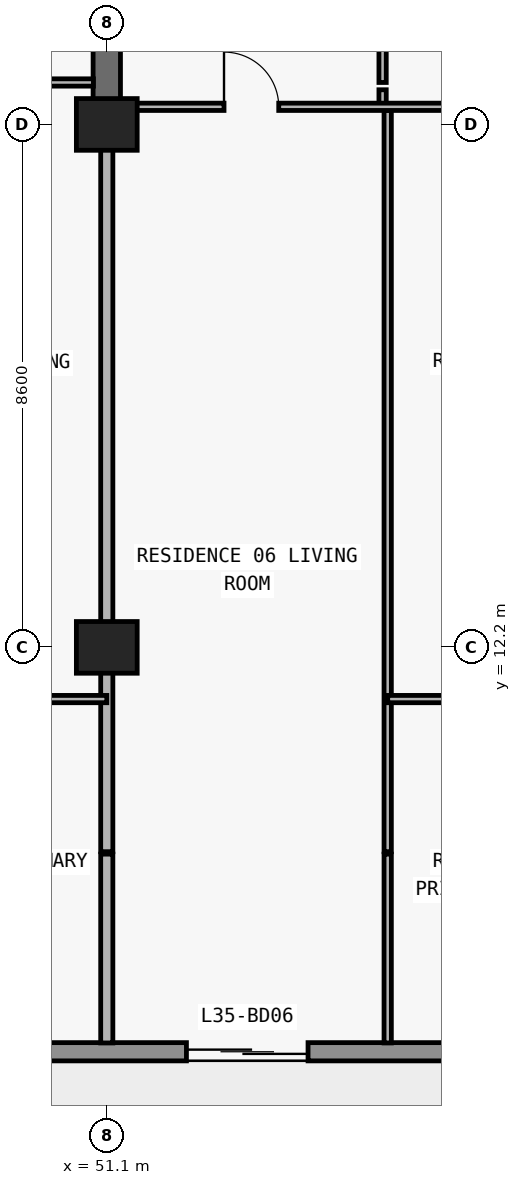
"""IFC4 building model, lengths in metres.
Left out: names, types, materials, properties, quantities, classifications, styles, units other than length and angle.
Written with IfcOpenShell. Run it as: python <this file> out.ifc"""

import sys

from ifc_helpers import new_model, si_unit, direction, frame, frame_2d, origin, origin_2d, place, context, subcontext, project, spatial, rectangle, extrude, element, fill, save


model = new_model("IFC4")
c1 = context("Model", 3, precision=1e-05, world=origin(), true_north=direction((0.0, 1.0)))
c2 = subcontext(c1, "Body", "Model", "MODEL_VIEW")
j1 = project(units=[si_unit("LENGTHUNIT", "METRE"), si_unit("PLANEANGLEUNIT", "RADIAN")], contexts=[c1])
p1 = place(None, origin())
s1 = spatial("IfcSite", under=j1, at=p1, CompositionType="ELEMENT")
p2 = place(p1, origin())
s2 = spatial("IfcBuilding", under=s1, at=p2, CompositionType="ELEMENT")
p3 = place(p2, frame((0.0, 0.0, 129.0)))
s3 = spatial("IfcBuildingStorey", under=s2, at=p3, CompositionType="ELEMENT", Elevation=129.0)
for number, where, z_axis, x_axis in (
    (1, (51.1, 12.2, 0.0), (0.0, 0.0, 1.0), (1.0, 0.0, 0.0)),
    (2, (51.1, 20.8, 0.0), (0.0, 0.0, 1.0), (1.0, 0.0, 0.0)),
):
    element("IfcColumn", number, at=place(p3, frame(where, z_axis=z_axis, x_axis=x_axis)), inside=s3, PredefinedType="COLUMN", context=c2, shape_type="SweptSolid", body=[
        extrude(rectangle(XDim=1.0, YDim=0.85, at=origin_2d()), origin(), (0.0, 0.0, 1.0), 3.05),
    ])
p4 = place(p3, frame((51.1, 20.8, 0.0), z_axis=(0.0, 0.0, 1.0), x_axis=(0.0, 1.0, 0.0)))
e3 = element("IfcWall", 3, at=p4, inside=s3, PredefinedType="SHEAR", context=c2, shape_type="SweptSolid", body=[
    extrude(rectangle(XDim=8.6, YDim=0.45, at=frame_2d((4.3, 0.0))), origin(), (0.0, 0.0, 1.0), 3.05),
])
p5 = place(p3, frame((70.1, 5.55, 0.0), z_axis=(0.0, 0.0, 1.0), x_axis=(-1.0, 0.0, 0.0)))
e4 = element("IfcWall", 4, at=p5, inside=s3, PredefinedType="STANDARD", context=c2, shape_type="SweptSolid", body=[
    extrude(rectangle(XDim=62.4, YDim=0.3, at=frame_2d((31.2, 0.0))), origin(), (0.0, 0.0, 1.0), 3.05),
])
p6 = place(p5, frame((57.226, 0.0, 0.0)))
e5 = element("IfcOpeningElement", 5, at=p6, cuts=e4, PredefinedType="OPENING", context=c2, shape_type="SweptSolid", body=[
    extrude(rectangle(XDim=2.0, YDim=2.3, at=frame_2d((1.0, 1.15))), frame((0.0, 0.16, 0.0), z_axis=(0.0, -1.0, 0.0), x_axis=(1.0, 0.0, 0.0)), (0.0, 0.0, 1.0), 0.32),
])
p7 = place(p5, frame((52.926, 0.0, 0.85)))
e6 = element("IfcOpeningElement", 6, at=p7, cuts=e4, PredefinedType="OPENING", context=c2, shape_type="SweptSolid", body=[
    extrude(rectangle(XDim=2.2, YDim=1.55, at=frame_2d((1.1, 0.775))), frame((0.0, 0.16, 0.0), z_axis=(0.0, -1.0, 0.0), x_axis=(1.0, 0.0, 0.0)), (0.0, 0.0, 1.0), 0.32),
])
p8 = place(p5, frame((48.49, 0.0, 0.0)))
e7 = element("IfcOpeningElement", 7, at=p8, cuts=e4, PredefinedType="OPENING", context=c2, shape_type="SweptSolid", body=[
    extrude(rectangle(XDim=2.0, YDim=2.3, at=frame_2d((1.0, 1.15))), frame((0.0, 0.16, 0.0), z_axis=(0.0, -1.0, 0.0), x_axis=(1.0, 0.0, 0.0)), (0.0, 0.0, 1.0), 0.32),
])
p9 = place(p5, frame((44.39, 0.0, 0.85)))
e8 = element("IfcOpeningElement", 8, at=p9, cuts=e4, PredefinedType="OPENING", context=c2, shape_type="SweptSolid", body=[
    extrude(rectangle(XDim=1.8, YDim=1.55, at=frame_2d((0.9, 0.775))), frame((0.0, 0.16, 0.0), z_axis=(0.0, -1.0, 0.0), x_axis=(1.0, 0.0, 0.0)), (0.0, 0.0, 1.0), 0.32),
])
p10 = place(p5, frame((40.426, 0.0, 0.0)))
e9 = element("IfcOpeningElement", 9, at=p10, cuts=e4, PredefinedType="OPENING", context=c2, shape_type="SweptSolid", body=[
    extrude(rectangle(XDim=2.0, YDim=2.3, at=frame_2d((1.0, 1.15))), frame((0.0, 0.16, 0.0), z_axis=(0.0, -1.0, 0.0), x_axis=(1.0, 0.0, 0.0)), (0.0, 0.0, 1.0), 0.32),
])
p11 = place(p5, frame((36.126, 0.0, 0.85)))
e10 = element("IfcOpeningElement", 10, at=p11, cuts=e4, PredefinedType="OPENING", context=c2, shape_type="SweptSolid", body=[
    extrude(rectangle(XDim=2.2, YDim=1.55, at=frame_2d((1.1, 0.775))), frame((0.0, 0.16, 0.0), z_axis=(0.0, -1.0, 0.0), x_axis=(1.0, 0.0, 0.0)), (0.0, 0.0, 1.0), 0.32),
])
p12 = place(p5, frame((31.91, 0.0, 0.0)))
e11 = element("IfcOpeningElement", 11, at=p12, cuts=e4, PredefinedType="OPENING", context=c2, shape_type="SweptSolid", body=[
    extrude(rectangle(XDim=2.0, YDim=2.3, at=frame_2d((1.0, 1.15))), frame((0.0, 0.16, 0.0), z_axis=(0.0, -1.0, 0.0), x_axis=(1.0, 0.0, 0.0)), (0.0, 0.0, 1.0), 0.32),
])
p13 = place(p5, frame((28.21, 0.0, 0.85)))
e12 = element("IfcOpeningElement", 12, at=p13, cuts=e4, PredefinedType="OPENING", context=c2, shape_type="SweptSolid", body=[
    extrude(rectangle(XDim=1.8, YDim=1.55, at=frame_2d((0.9, 0.775))), frame((0.0, 0.16, 0.0), z_axis=(0.0, -1.0, 0.0), x_axis=(1.0, 0.0, 0.0)), (0.0, 0.0, 1.0), 0.32),
])
p14 = place(p5, frame((24.426, 0.0, 0.0)))
e13 = element("IfcOpeningElement", 13, at=p14, cuts=e4, PredefinedType="OPENING", context=c2, shape_type="SweptSolid", body=[
    extrude(rectangle(XDim=2.0, YDim=2.3, at=frame_2d((1.0, 1.15))), frame((0.0, 0.16, 0.0), z_axis=(0.0, -1.0, 0.0), x_axis=(1.0, 0.0, 0.0)), (0.0, 0.0, 1.0), 0.32),
])
p15 = place(p5, frame((20.126, 0.0, 0.85)))
e14 = element("IfcOpeningElement", 14, at=p15, cuts=e4, PredefinedType="OPENING", context=c2, shape_type="SweptSolid", body=[
    extrude(rectangle(XDim=2.2, YDim=1.55, at=frame_2d((1.1, 0.775))), frame((0.0, 0.16, 0.0), z_axis=(0.0, -1.0, 0.0), x_axis=(1.0, 0.0, 0.0)), (0.0, 0.0, 1.0), 0.32),
])
p16 = place(p5, frame((15.69, 0.0, 0.0)))
e15 = element("IfcOpeningElement", 15, at=p16, cuts=e4, PredefinedType="OPENING", context=c2, shape_type="SweptSolid", body=[
    extrude(rectangle(XDim=2.0, YDim=2.3, at=frame_2d((1.0, 1.15))), frame((0.0, 0.16, 0.0), z_axis=(0.0, -1.0, 0.0), x_axis=(1.0, 0.0, 0.0)), (0.0, 0.0, 1.0), 0.32),
])
p17 = place(p5, frame((11.59, 0.0, 0.85)))
e16 = element("IfcOpeningElement", 16, at=p17, cuts=e4, PredefinedType="OPENING", context=c2, shape_type="SweptSolid", body=[
    extrude(rectangle(XDim=1.8, YDim=1.55, at=frame_2d((0.9, 0.775))), frame((0.0, 0.16, 0.0), z_axis=(0.0, -1.0, 0.0), x_axis=(1.0, 0.0, 0.0)), (0.0, 0.0, 1.0), 0.32),
])
p18 = place(p5, frame((7.626, 0.0, 0.0)))
e17 = element("IfcOpeningElement", 17, at=p18, cuts=e4, PredefinedType="OPENING", context=c2, shape_type="SweptSolid", body=[
    extrude(rectangle(XDim=2.0, YDim=2.3, at=frame_2d((1.0, 1.15))), frame((0.0, 0.16, 0.0), z_axis=(0.0, -1.0, 0.0), x_axis=(1.0, 0.0, 0.0)), (0.0, 0.0, 1.0), 0.32),
])
p19 = place(p5, frame((3.326, 0.0, 0.85)))
e18 = element("IfcOpeningElement", 18, at=p19, cuts=e4, PredefinedType="OPENING", context=c2, shape_type="SweptSolid", body=[
    extrude(rectangle(XDim=2.2, YDim=1.55, at=frame_2d((1.1, 0.775))), frame((0.0, 0.16, 0.0), z_axis=(0.0, -1.0, 0.0), x_axis=(1.0, 0.0, 0.0)), (0.0, 0.0, 1.0), 0.32),
])
p20 = place(p3, frame((51.1, 5.695, 0.0), z_axis=(0.0, 0.0, 1.0), x_axis=(0.0, 1.0, 0.0)))
e19 = element("IfcWall", 19, at=p20, inside=s3, PredefinedType="PARTITIONING", context=c2, shape_type="SweptSolid", body=[
    extrude(rectangle(XDim=3.105, YDim=0.2, at=frame_2d((1.552, 0.0))), origin(), (0.0, 0.0, 1.0), 3.05),
])
p21 = place(p3, frame((51.1, 8.84, 0.0), z_axis=(0.0, 0.0, 1.0), x_axis=(0.0, 1.0, 0.0)))
e20 = element("IfcWall", 20, at=p21, inside=s3, PredefinedType="PARTITIONING", context=c2, shape_type="SweptSolid", body=[
    extrude(rectangle(XDim=11.955, YDim=0.2, at=frame_2d((5.978, 0.0))), origin(), (0.0, 0.0, 1.0), 2.174),
])
p22 = place(p3, frame((55.636, 21.13, 0.0), z_axis=(0.0, 0.0, 1.0), x_axis=(0.0, 1.0, 0.0)))
e21 = element("IfcWall", 21, at=p22, inside=s3, PredefinedType="PARTITIONING", context=c2, shape_type="SweptSolid", body=[
    extrude(rectangle(XDim=0.24, YDim=0.12, at=frame_2d((0.12, 0.0))), origin(), (0.0, 0.0, 1.0), 3.05),
])
p23 = place(p3, frame((55.636, 21.49, 0.0), z_axis=(0.0, 0.0, 1.0), x_axis=(0.0, 1.0, 0.0)))
e22 = element("IfcWall", 22, at=p23, inside=s3, PredefinedType="PARTITIONING", context=c2, shape_type="SweptSolid", body=[
    extrude(rectangle(XDim=4.69, YDim=0.12, at=frame_2d((2.345, 0.0))), origin(), (0.0, 0.0, 1.0), 3.05),
])
p24 = place(p23, frame((1.895, 0.0, 0.0)))
e23 = element("IfcOpeningElement", 23, at=p24, cuts=e22, PredefinedType="OPENING", context=c2, shape_type="SweptSolid", body=[
    extrude(rectangle(XDim=0.9, YDim=2.15, at=frame_2d((0.45, 1.075))), frame((0.0, 0.07, 0.0), z_axis=(0.0, -1.0, 0.0), x_axis=(1.0, 0.0, 0.0)), (0.0, 0.0, 1.0), 0.14),
])
p25 = place(p3, frame((55.72, 5.695, 0.0), z_axis=(0.0, 0.0, 1.0), x_axis=(0.0, 1.0, 0.0)))
e24 = element("IfcWall", 24, at=p25, inside=s3, PredefinedType="PARTITIONING", context=c2, shape_type="SweptSolid", body=[
    extrude(rectangle(XDim=3.105, YDim=0.12, at=frame_2d((1.552, 0.0))), origin(), (0.0, 0.0, 1.0), 3.05),
])
p26 = place(p3, frame((55.72, 8.84, 0.0), z_axis=(0.0, 0.0, 1.0), x_axis=(0.0, 1.0, 0.0)))
e25 = element("IfcWall", 25, at=p26, inside=s3, PredefinedType="PARTITIONING", context=c2, shape_type="SweptSolid", body=[
    extrude(rectangle(XDim=12.19, YDim=0.12, at=frame_2d((6.095, 0.0))), origin(), (0.0, 0.0, 1.0), 3.05),
])
p27 = place(p3, frame((46.648, 11.35, 0.0), z_axis=(0.0, 0.0, 1.0), x_axis=(1.0, 0.0, 0.0)))
e26 = element("IfcWall", 26, at=p27, inside=s3, PredefinedType="PARTITIONING", context=c2, shape_type="SweptSolid", body=[
    extrude(rectangle(XDim=4.452, YDim=0.12, at=frame_2d((2.226, 0.0))), origin(), (0.0, 0.0, 1.0), 3.05),
])
p28 = place(p27, frame((1.776, 0.0, 0.0)))
e27 = element("IfcOpeningElement", 27, at=p28, cuts=e26, PredefinedType="OPENING", context=c2, shape_type="SweptSolid", body=[
    extrude(rectangle(XDim=0.9, YDim=2.15, at=frame_2d((0.45, 1.075))), frame((0.0, 0.07, 0.0), z_axis=(0.0, -1.0, 0.0), x_axis=(1.0, 0.0, 0.0)), (0.0, 0.0, 1.0), 0.14),
])
p29 = place(p3, frame((55.72, 11.35, 0.0), z_axis=(0.0, 0.0, 1.0), x_axis=(1.0, 0.0, 0.0)))
e28 = element("IfcWall", 28, at=p29, inside=s3, PredefinedType="PARTITIONING", context=c2, shape_type="SweptSolid", body=[
    extrude(rectangle(XDim=3.78, YDim=0.12, at=frame_2d((1.89, 0.0))), origin(), (0.0, 0.0, 1.0), 3.05),
])
p30 = place(p29, frame((1.44, 0.0, 0.0)))
e29 = element("IfcOpeningElement", 29, at=p30, cuts=e28, PredefinedType="OPENING", context=c2, shape_type="SweptSolid", body=[
    extrude(rectangle(XDim=0.9, YDim=2.15, at=frame_2d((0.45, 1.075))), frame((0.0, 0.07, 0.0), z_axis=(0.0, -1.0, 0.0), x_axis=(1.0, 0.0, 0.0)), (0.0, 0.0, 1.0), 0.14),
])
p31 = place(p3, frame((51.32, 21.09, 0.0), z_axis=(0.0, 0.0, 1.0), x_axis=(1.0, 0.0, 0.0)))
e30 = element("IfcWall", 30, at=p31, inside=s3, PredefinedType="PARTITIONING", context=c2, shape_type="SweptSolid", body=[
    extrude(rectangle(XDim=8.18, YDim=0.12, at=frame_2d((4.09, 0.0))), origin(), (0.0, 0.0, 1.0), 2.174),
])
p32 = place(p31, frame((1.708, 0.0, 0.0)))
e31 = element("IfcOpeningElement", 31, at=p32, cuts=e30, PredefinedType="OPENING", context=c2, shape_type="SweptSolid", body=[
    extrude(rectangle(XDim=0.9, YDim=2.124, at=frame_2d((0.45, 1.062))), frame((0.0, 0.07, 0.0), z_axis=(0.0, -1.0, 0.0), x_axis=(1.0, 0.0, 0.0)), (0.0, 0.0, 1.0), 0.14),
])
p33 = place(p31, frame((5.84, 0.0, 0.0)))
e32 = element("IfcOpeningElement", 32, at=p33, cuts=e30, PredefinedType="OPENING", context=c2, shape_type="SweptSolid", body=[
    extrude(rectangle(XDim=0.9, YDim=2.124, at=frame_2d((0.45, 1.062))), frame((0.0, 0.07, 0.0), z_axis=(0.0, -1.0, 0.0), x_axis=(1.0, 0.0, 0.0)), (0.0, 0.0, 1.0), 0.14),
])
p34 = place(p3, frame((42.7, 21.49, 0.0), z_axis=(0.0, 0.0, 1.0), x_axis=(1.0, 0.0, 0.0)))
e33 = element("IfcWall", 33, at=p34, inside=s3, PredefinedType="PARTITIONING", context=c2, shape_type="SweptSolid", body=[
    extrude(rectangle(XDim=8.18, YDim=0.12, at=frame_2d((4.09, 0.0))), origin(), (0.0, 0.0, 1.0), 3.05),
])
p35 = place(p34, frame((1.524, 0.0, 0.0)))
e34 = element("IfcOpeningElement", 34, at=p35, cuts=e33, PredefinedType="OPENING", context=c2, shape_type="SweptSolid", body=[
    extrude(rectangle(XDim=0.9, YDim=2.15, at=frame_2d((0.45, 1.075))), frame((0.0, 0.07, 0.0), z_axis=(0.0, -1.0, 0.0), x_axis=(1.0, 0.0, 0.0)), (0.0, 0.0, 1.0), 0.14),
])
p36 = place(p34, frame((5.783, 0.0, 0.0)))
e35 = element("IfcOpeningElement", 35, at=p36, cuts=e33, PredefinedType="OPENING", context=c2, shape_type="SweptSolid", body=[
    extrude(rectangle(XDim=0.9, YDim=2.15, at=frame_2d((0.45, 1.075))), frame((0.0, 0.07, 0.0), z_axis=(0.0, -1.0, 0.0), x_axis=(1.0, 0.0, 0.0)), (0.0, 0.0, 1.0), 0.14),
])
p37 = place(p16, origin())
e36 = element("IfcDoor", 36, at=p37, inside=s3, OperationType="DOUBLE_DOOR_SLIDING", PredefinedType="DOOR", context=c2, shape_type="SweptSolid", body=[
    extrude(rectangle(XDim=2.0, YDim=2.3, at=frame_2d((1.0, 1.15))), frame((0.0, 0.025, 0.0), z_axis=(0.0, -1.0, 0.0), x_axis=(1.0, 0.0, 0.0)), (0.0, 0.0, 1.0), 0.05),
])
fill(e15, e36)
p38 = place(p32, origin())
e37 = element("IfcDoor", 37, at=p38, inside=s3, OperationType="SINGLE_SWING_LEFT", PredefinedType="DOOR", context=c2, shape_type="SweptSolid", body=[
    extrude(rectangle(XDim=0.9, YDim=2.124, at=frame_2d((0.45, 1.062))), frame((0.0, 0.025, 0.0), z_axis=(0.0, -1.0, 0.0), x_axis=(1.0, 0.0, 0.0)), (0.0, 0.0, 1.0), 0.05),
])
fill(e31, e37)
save(model, sys.argv[1])
